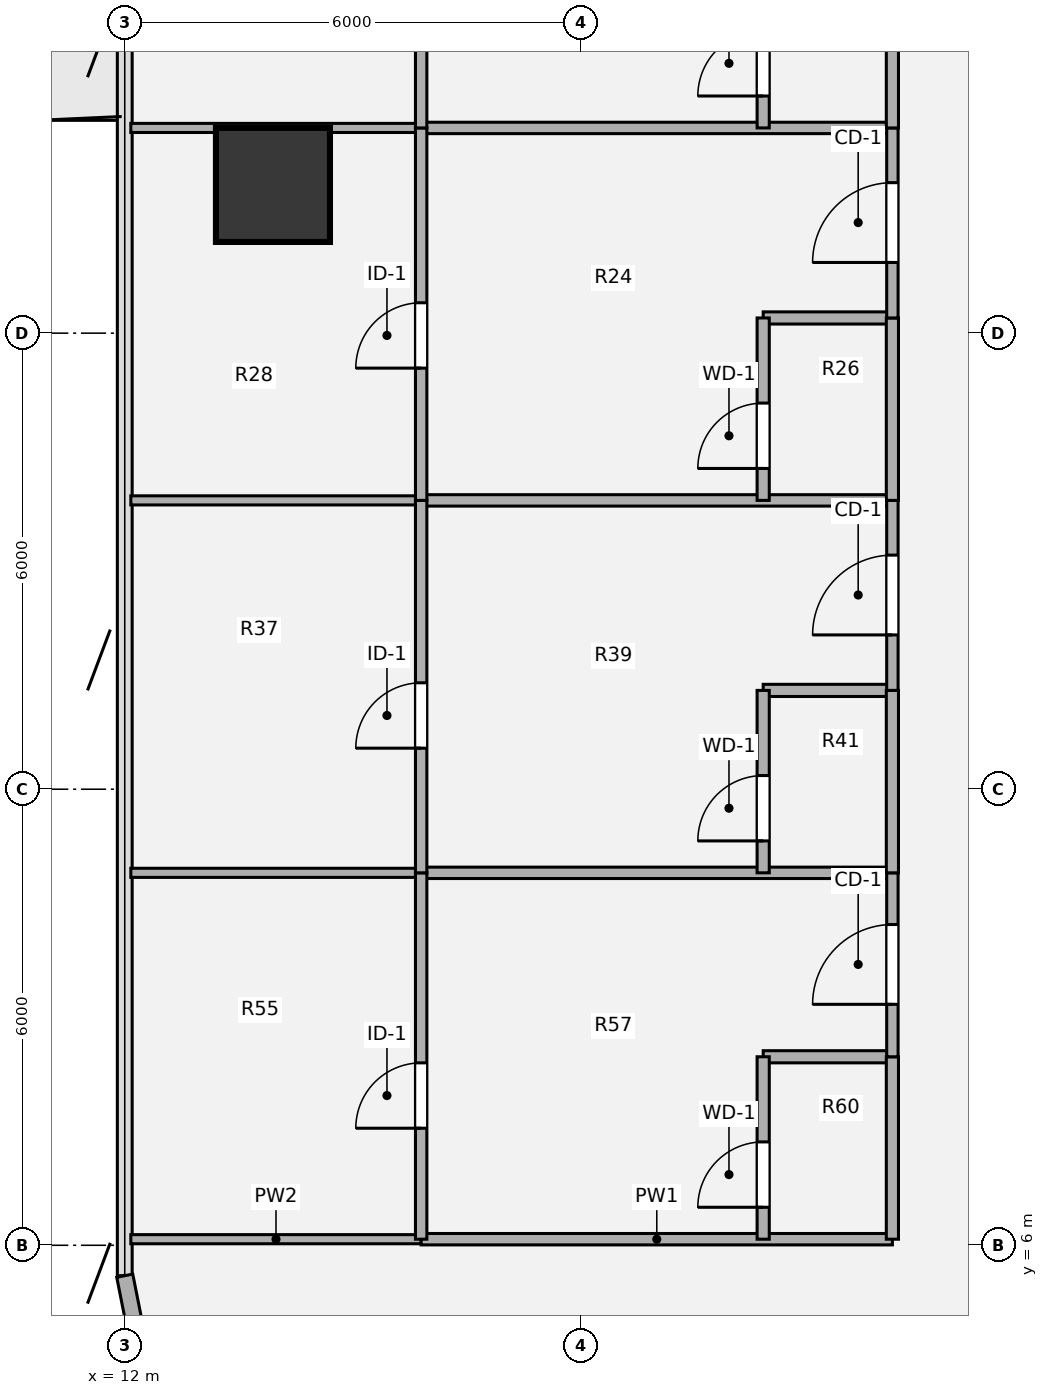
"""IFC4 building model, lengths in metres.
Left out: names, types, materials, properties, quantities, classifications, styles, units other than length and angle.
Written with IfcOpenShell. Run it as: python <this file> out.ifc"""

import sys

from ifc_helpers import new_model, si_unit, direction, frame, frame_2d, origin, origin_2d, place, context, subcontext, project, spatial, rectangle, hollow_circle, extrude, source, transform, mapped, element, fill, save


model = new_model("IFC4")
c1 = context("Model", 3, precision=1e-05, world=origin(), true_north=direction((0.0, 1.0)))
c2 = subcontext(c1, "Body", "Model", "MODEL_VIEW")
j1 = project(units=[si_unit("LENGTHUNIT", "METRE"), si_unit("PLANEANGLEUNIT", "RADIAN")], contexts=[c1])
p1 = place(None, origin())
s1 = spatial("IfcSite", under=j1, at=p1, CompositionType="ELEMENT")
p2 = place(p1, origin())
s2 = spatial("IfcBuilding", under=s1, at=p2, CompositionType="ELEMENT")
p3 = place(p2, frame((0.0, 0.0, 68.58)))
s3 = spatial("IfcBuildingStorey", under=s2, at=p3, CompositionType="ELEMENT", Elevation=68.58)
m1 = source(origin(), c2, "Body", "SweptSolid", [
    extrude(hollow_circle(Radius=0.75, WallThickness=0.05, at=origin_2d()), origin(), (0.0, 0.0, 1.0), 3.78),
])
p4 = place(p3, frame((13.95, 19.95, 0.0), z_axis=(0.0, 0.0, 1.0), x_axis=(1.0, 0.0, 0.0)))
e1 = element("IfcColumn", 1, at=p4, inside=s3, PredefinedType="COLUMN", context=c2, shape_type="MappedRepresentation", body=[
    mapped(m1, transform((0.0, 0.0, 0.0), x_axis=(1.0, 0.0, 0.0), y_axis=(0.0, 1.0, 0.0), z_axis=(0.0, 0.0, 1.0), scale=1.0)),
])
p5 = place(p3, frame((12.244, 4.375, 0.0), z_axis=(0.0, 0.0, 1.0), x_axis=(-0.195138390419, 0.980775717779, 0.0)))
e2 = element("IfcWall", 2, at=p5, inside=s3, PredefinedType="SOLIDWALL", context=c2, shape_type="SweptSolid", body=[
    extrude(rectangle(XDim=1.249, YDim=0.215, at=frame_2d((0.624, 0.0))), origin(), (0.0, 0.0, 1.0), 3.53),
])
p6 = place(p3, frame((12.08, 6.08, 0.0), z_axis=(0.0, 0.0, 1.0), x_axis=(1.0, 0.0, 0.0)))
e3 = element("IfcWall", 3, at=p6, inside=s3, PredefinedType="PARTITIONING", context=c2, shape_type="SweptSolid", body=[
    extrude(rectangle(XDim=3.82, YDim=0.12, at=frame_2d((1.91, 0.0))), origin(), (0.0, 0.0, 1.0), 3.5),
])
p7 = place(p3, frame((15.9, 6.08, 0.0), z_axis=(0.0, 0.0, 1.0), x_axis=(1.0, 0.0, 0.0)))
e4 = element("IfcWall", 4, at=p7, inside=s3, PredefinedType="PARTITIONING", context=c2, shape_type="SweptSolid", body=[
    extrude(rectangle(XDim=6.2, YDim=0.15, at=frame_2d((3.1, 0.0))), origin(), (0.0, 0.0, 1.0), 3.5),
])
p8 = place(p3, frame((20.4, 8.48, 0.0), z_axis=(0.0, 0.0, 1.0), x_axis=(1.0, 0.0, 0.0)))
e5 = element("IfcWall", 5, at=p8, inside=s3, PredefinedType="PLUMBINGWALL", context=c2, shape_type="SweptSolid", body=[
    extrude(rectangle(XDim=1.7, YDim=0.16, at=frame_2d((0.85, 0.0))), origin(), (0.0, 0.0, 1.0), 3.5),
])
p9 = place(p3, frame((12.08, 10.9, 0.0), z_axis=(0.0, 0.0, 1.0), x_axis=(1.0, 0.0, 0.0)))
e6 = element("IfcWall", 6, at=p9, inside=s3, PredefinedType="PARTITIONING", context=c2, shape_type="SweptSolid", body=[
    extrude(rectangle(XDim=3.82, YDim=0.12, at=frame_2d((1.91, 0.0))), origin(), (0.0, 0.0, 1.0), 3.5),
])
p10 = place(p3, frame((15.9, 10.9, 0.0), z_axis=(0.0, 0.0, 1.0), x_axis=(1.0, 0.0, 0.0)))
e7 = element("IfcWall", 7, at=p10, inside=s3, PredefinedType="PARTITIONING", context=c2, shape_type="SweptSolid", body=[
    extrude(rectangle(XDim=6.2, YDim=0.15, at=frame_2d((3.1, 0.0))), origin(), (0.0, 0.0, 1.0), 3.5),
])
p11 = place(p3, frame((20.4, 13.3, 0.0), z_axis=(0.0, 0.0, 1.0), x_axis=(1.0, 0.0, 0.0)))
e8 = element("IfcWall", 8, at=p11, inside=s3, PredefinedType="PLUMBINGWALL", context=c2, shape_type="SweptSolid", body=[
    extrude(rectangle(XDim=1.7, YDim=0.16, at=frame_2d((0.85, 0.0))), origin(), (0.0, 0.0, 1.0), 3.5),
])
p12 = place(p3, frame((12.08, 15.8, 0.0), z_axis=(0.0, 0.0, 1.0), x_axis=(1.0, 0.0, 0.0)))
e9 = element("IfcWall", 9, at=p12, inside=s3, PredefinedType="PARTITIONING", context=c2, shape_type="SweptSolid", body=[
    extrude(rectangle(XDim=3.82, YDim=0.12, at=frame_2d((1.91, 0.0))), origin(), (0.0, 0.0, 1.0), 3.5),
])
p13 = place(p3, frame((15.9, 15.8, 0.0), z_axis=(0.0, 0.0, 1.0), x_axis=(1.0, 0.0, 0.0)))
e10 = element("IfcWall", 10, at=p13, inside=s3, PredefinedType="PARTITIONING", context=c2, shape_type="SweptSolid", body=[
    extrude(rectangle(XDim=6.2, YDim=0.15, at=frame_2d((3.1, 0.0))), origin(), (0.0, 0.0, 1.0), 3.5),
])
p14 = place(p3, frame((20.4, 18.2, 0.0), z_axis=(0.0, 0.0, 1.0), x_axis=(1.0, 0.0, 0.0)))
e11 = element("IfcWall", 11, at=p14, inside=s3, PredefinedType="PLUMBINGWALL", context=c2, shape_type="SweptSolid", body=[
    extrude(rectangle(XDim=1.7, YDim=0.16, at=frame_2d((0.85, 0.0))), origin(), (0.0, 0.0, 1.0), 2.715),
])
p15 = place(p3, frame((12.08, 20.7, 0.0), z_axis=(0.0, 0.0, 1.0), x_axis=(1.0, 0.0, 0.0)))
e12 = element("IfcWall", 12, at=p15, inside=s3, PredefinedType="PARTITIONING", context=c2, shape_type="SweptSolid", body=[
    extrude(rectangle(XDim=3.82, YDim=0.12, at=frame_2d((1.91, 0.0))), origin(), (0.0, 0.0, 1.0), 2.982),
])
p16 = place(p3, frame((15.9, 20.7, 0.0), z_axis=(0.0, 0.0, 1.0), x_axis=(1.0, 0.0, 0.0)))
e13 = element("IfcWall", 13, at=p16, inside=s3, PredefinedType="PARTITIONING", context=c2, shape_type="SweptSolid", body=[
    extrude(rectangle(XDim=6.2, YDim=0.15, at=frame_2d((3.1, 0.0))), origin(), (0.0, 0.0, 1.0), 2.982),
])
p17 = place(p3, frame((15.9, 6.08, 0.0), z_axis=(0.0, 0.0, 1.0), x_axis=(0.0, 1.0, 0.0)))
e14 = element("IfcWall", 14, at=p17, inside=s3, PredefinedType="PARTITIONING", context=c2, shape_type="SweptSolid", body=[
    extrude(rectangle(XDim=4.82, YDim=0.15, at=frame_2d((2.41, 0.0))), origin(), (0.0, 0.0, 1.0), 3.5),
])
p18 = place(p17, frame((1.46, 0.0, 0.0)))
e15 = element("IfcOpeningElement", 15, at=p18, cuts=e14, PredefinedType="OPENING", context=c2, shape_type="SweptSolid", body=[
    extrude(rectangle(XDim=0.86, YDim=2.1, at=origin_2d()), frame((0.43, 0.085, 1.05), z_axis=(0.0, -1.0, 0.0), x_axis=(1.0, 0.0, 0.0)), (0.0, 0.0, 1.0), 0.17),
])
p19 = place(p3, frame((15.9, 10.9, 0.0), z_axis=(0.0, 0.0, 1.0), x_axis=(0.0, 1.0, 0.0)))
e16 = element("IfcWall", 16, at=p19, inside=s3, PredefinedType="PARTITIONING", context=c2, shape_type="SweptSolid", body=[
    extrude(rectangle(XDim=4.9, YDim=0.15, at=frame_2d((2.45, 0.0))), origin(), (0.0, 0.0, 1.0), 3.5),
])
p20 = place(p19, frame((1.64, 0.0, 0.0)))
e17 = element("IfcOpeningElement", 17, at=p20, cuts=e16, PredefinedType="OPENING", context=c2, shape_type="SweptSolid", body=[
    extrude(rectangle(XDim=0.86, YDim=2.1, at=origin_2d()), frame((0.43, 0.085, 1.05), z_axis=(0.0, -1.0, 0.0), x_axis=(1.0, 0.0, 0.0)), (0.0, 0.0, 1.0), 0.17),
])
p21 = place(p3, frame((15.9, 15.8, 0.0), z_axis=(0.0, 0.0, 1.0), x_axis=(0.0, 1.0, 0.0)))
e18 = element("IfcWall", 18, at=p21, inside=s3, PredefinedType="PARTITIONING", context=c2, shape_type="SweptSolid", body=[
    extrude(rectangle(XDim=4.9, YDim=0.15, at=frame_2d((2.45, 0.0))), origin(), (0.0, 0.0, 1.0), 3.5),
])
p22 = place(p21, frame((1.74, 0.0, 0.0)))
e19 = element("IfcOpeningElement", 19, at=p22, cuts=e18, PredefinedType="OPENING", context=c2, shape_type="SweptSolid", body=[
    extrude(rectangle(XDim=0.86, YDim=2.1, at=origin_2d()), frame((0.43, 0.085, 1.05), z_axis=(0.0, -1.0, 0.0), x_axis=(1.0, 0.0, 0.0)), (0.0, 0.0, 1.0), 0.17),
])
p23 = place(p3, frame((15.9, 20.7, 0.0), z_axis=(0.0, 0.0, 1.0), x_axis=(0.0, 1.0, 0.0)))
e20 = element("IfcWall", 20, at=p23, inside=s3, PredefinedType="PARTITIONING", context=c2, shape_type="SweptSolid", body=[
    extrude(rectangle(XDim=4.9, YDim=0.15, at=frame_2d((2.45, 0.0))), origin(), (0.0, 0.0, 1.0), 3.5),
])
p24 = place(p23, frame((1.84, 0.0, 0.0)))
e21 = element("IfcOpeningElement", 21, at=p24, cuts=e20, PredefinedType="OPENING", context=c2, shape_type="SweptSolid", body=[
    extrude(rectangle(XDim=0.86, YDim=2.1, at=origin_2d()), frame((0.43, 0.085, 1.05), z_axis=(0.0, -1.0, 0.0), x_axis=(1.0, 0.0, 0.0)), (0.0, 0.0, 1.0), 0.17),
])
p25 = place(p3, frame((20.4, 6.08, 0.0), z_axis=(0.0, 0.0, 1.0), x_axis=(0.0, 1.0, 0.0)))
e22 = element("IfcWall", 22, at=p25, inside=s3, PredefinedType="PLUMBINGWALL", context=c2, shape_type="SweptSolid", body=[
    extrude(rectangle(XDim=2.4, YDim=0.16, at=frame_2d((1.2, 0.0))), origin(), (0.0, 0.0, 1.0), 3.5),
])
p26 = place(p25, frame((0.42, 0.0, 0.0)))
e23 = element("IfcOpeningElement", 23, at=p26, cuts=e22, PredefinedType="OPENING", context=c2, shape_type="SweptSolid", body=[
    extrude(rectangle(XDim=0.86, YDim=2.1, at=origin_2d()), frame((0.43, 0.09, 1.05), z_axis=(0.0, -1.0, 0.0), x_axis=(1.0, 0.0, 0.0)), (0.0, 0.0, 1.0), 0.18),
])
p27 = place(p3, frame((20.4, 10.9, 0.0), z_axis=(0.0, 0.0, 1.0), x_axis=(0.0, 1.0, 0.0)))
e24 = element("IfcWall", 24, at=p27, inside=s3, PredefinedType="PLUMBINGWALL", context=c2, shape_type="SweptSolid", body=[
    extrude(rectangle(XDim=2.4, YDim=0.16, at=frame_2d((1.2, 0.0))), origin(), (0.0, 0.0, 1.0), 3.5),
])
p28 = place(p27, frame((0.42, 0.0, 0.0)))
e25 = element("IfcOpeningElement", 25, at=p28, cuts=e24, PredefinedType="OPENING", context=c2, shape_type="SweptSolid", body=[
    extrude(rectangle(XDim=0.86, YDim=2.1, at=origin_2d()), frame((0.43, 0.09, 1.05), z_axis=(0.0, -1.0, 0.0), x_axis=(1.0, 0.0, 0.0)), (0.0, 0.0, 1.0), 0.18),
])
p29 = place(p3, frame((20.4, 15.8, 0.0), z_axis=(0.0, 0.0, 1.0), x_axis=(0.0, 1.0, 0.0)))
e26 = element("IfcWall", 26, at=p29, inside=s3, PredefinedType="PLUMBINGWALL", context=c2, shape_type="SweptSolid", body=[
    extrude(rectangle(XDim=2.4, YDim=0.16, at=frame_2d((1.2, 0.0))), origin(), (0.0, 0.0, 1.0), 3.5),
])
p30 = place(p29, frame((0.42, 0.0, 0.0)))
e27 = element("IfcOpeningElement", 27, at=p30, cuts=e26, PredefinedType="OPENING", context=c2, shape_type="SweptSolid", body=[
    extrude(rectangle(XDim=0.86, YDim=2.1, at=origin_2d()), frame((0.43, 0.09, 1.05), z_axis=(0.0, -1.0, 0.0), x_axis=(1.0, 0.0, 0.0)), (0.0, 0.0, 1.0), 0.18),
])
p31 = place(p3, frame((20.4, 20.7, 0.0), z_axis=(0.0, 0.0, 1.0), x_axis=(0.0, 1.0, 0.0)))
e28 = element("IfcWall", 28, at=p31, inside=s3, PredefinedType="PLUMBINGWALL", context=c2, shape_type="SweptSolid", body=[
    extrude(rectangle(XDim=2.4, YDim=0.16, at=frame_2d((1.2, 0.0))), origin(), (0.0, 0.0, 1.0), 3.5),
])
p32 = place(p31, frame((0.42, 0.0, 0.0)))
e29 = element("IfcOpeningElement", 29, at=p32, cuts=e28, PredefinedType="OPENING", context=c2, shape_type="SweptSolid", body=[
    extrude(rectangle(XDim=0.86, YDim=2.1, at=origin_2d()), frame((0.43, 0.09, 1.05), z_axis=(0.0, -1.0, 0.0), x_axis=(1.0, 0.0, 0.0)), (0.0, 0.0, 1.0), 0.18),
])
p33 = place(p3, frame((22.1, 6.08, 0.0), z_axis=(0.0, 0.0, 1.0), x_axis=(0.0, 1.0, 0.0)))
e30 = element("IfcWall", 30, at=p33, inside=s3, PredefinedType="PLUMBINGWALL", context=c2, shape_type="SweptSolid", body=[
    extrude(rectangle(XDim=2.4, YDim=0.16, at=frame_2d((1.2, 0.0))), origin(), (0.0, 0.0, 1.0), 3.5),
])
p34 = place(p3, frame((22.1, 8.48, 0.0), z_axis=(0.0, 0.0, 1.0), x_axis=(0.0, 1.0, 0.0)))
e31 = element("IfcWall", 31, at=p34, inside=s3, PredefinedType="PARTITIONING", context=c2, shape_type="SweptSolid", body=[
    extrude(rectangle(XDim=2.42, YDim=0.15, at=frame_2d((1.21, 0.0))), origin(), (0.0, 0.0, 1.0), 3.5),
])
p35 = place(p34, frame((0.69, 0.0, 0.0)))
e32 = element("IfcOpeningElement", 32, at=p35, cuts=e31, PredefinedType="OPENING", context=c2, shape_type="SweptSolid", body=[
    extrude(rectangle(XDim=1.05, YDim=2.1, at=origin_2d()), frame((0.525, 0.085, 1.05), z_axis=(0.0, -1.0, 0.0), x_axis=(1.0, 0.0, 0.0)), (0.0, 0.0, 1.0), 0.17),
])
p36 = place(p3, frame((22.1, 10.9, 0.0), z_axis=(0.0, 0.0, 1.0), x_axis=(0.0, 1.0, 0.0)))
e33 = element("IfcWall", 33, at=p36, inside=s3, PredefinedType="PLUMBINGWALL", context=c2, shape_type="SweptSolid", body=[
    extrude(rectangle(XDim=2.4, YDim=0.16, at=frame_2d((1.2, 0.0))), origin(), (0.0, 0.0, 1.0), 3.5),
])
p37 = place(p3, frame((22.1, 13.3, 0.0), z_axis=(0.0, 0.0, 1.0), x_axis=(0.0, 1.0, 0.0)))
e34 = element("IfcWall", 34, at=p37, inside=s3, PredefinedType="PARTITIONING", context=c2, shape_type="SweptSolid", body=[
    extrude(rectangle(XDim=2.5, YDim=0.15, at=frame_2d((1.25, 0.0))), origin(), (0.0, 0.0, 1.0), 3.5),
])
p38 = place(p37, frame((0.73, 0.0, 0.0)))
e35 = element("IfcOpeningElement", 35, at=p38, cuts=e34, PredefinedType="OPENING", context=c2, shape_type="SweptSolid", body=[
    extrude(rectangle(XDim=1.05, YDim=2.1, at=origin_2d()), frame((0.525, 0.085, 1.05), z_axis=(0.0, -1.0, 0.0), x_axis=(1.0, 0.0, 0.0)), (0.0, 0.0, 1.0), 0.17),
])
p39 = place(p3, frame((22.1, 15.8, 0.0), z_axis=(0.0, 0.0, 1.0), x_axis=(0.0, 1.0, 0.0)))
e36 = element("IfcWall", 36, at=p39, inside=s3, PredefinedType="PLUMBINGWALL", context=c2, shape_type="SweptSolid", body=[
    extrude(rectangle(XDim=2.4, YDim=0.16, at=frame_2d((1.2, 0.0))), origin(), (0.0, 0.0, 1.0), 3.5),
])
p40 = place(p3, frame((22.1, 18.2, 0.0), z_axis=(0.0, 0.0, 1.0), x_axis=(0.0, 1.0, 0.0)))
e37 = element("IfcWall", 37, at=p40, inside=s3, PredefinedType="PARTITIONING", context=c2, shape_type="SweptSolid", body=[
    extrude(rectangle(XDim=2.5, YDim=0.15, at=frame_2d((1.25, 0.0))), origin(), (0.0, 0.0, 1.0), 3.5),
])
p41 = place(p40, frame((0.73, 0.0, 0.0)))
e38 = element("IfcOpeningElement", 38, at=p41, cuts=e37, PredefinedType="OPENING", context=c2, shape_type="SweptSolid", body=[
    extrude(rectangle(XDim=1.05, YDim=2.1, at=origin_2d()), frame((0.525, 0.085, 1.05), z_axis=(0.0, -1.0, 0.0), x_axis=(1.0, 0.0, 0.0)), (0.0, 0.0, 1.0), 0.17),
])
p42 = place(p3, frame((22.1, 20.7, 0.0), z_axis=(0.0, 0.0, 1.0), x_axis=(0.0, 1.0, 0.0)))
e39 = element("IfcWall", 39, at=p42, inside=s3, PredefinedType="PLUMBINGWALL", context=c2, shape_type="SweptSolid", body=[
    extrude(rectangle(XDim=2.4, YDim=0.16, at=frame_2d((1.2, 0.0))), origin(), (0.0, 0.0, 1.0), 3.5),
])
m2 = source(origin(), c2, "Body", "SweptSolid", [
    extrude(rectangle(XDim=0.86, YDim=2.1, at=origin_2d()), frame((0.43, 0.025, 1.05), z_axis=(0.0, -1.0, 0.0), x_axis=(1.0, 0.0, 0.0)), (0.0, 0.0, 1.0), 0.05),
])
p43 = place(p18, origin())
e40 = element("IfcDoor", 40, at=p43, inside=s3, OperationType="SINGLE_SWING_LEFT", PredefinedType="DOOR", context=c2, shape_type="MappedRepresentation", body=[
    mapped(m2, transform((0.0, 0.0, 0.0), x_axis=(1.0, 0.0, 0.0), y_axis=(0.0, 1.0, 0.0), z_axis=(0.0, 0.0, 1.0), scale=1.0)),
])
fill(e15, e40)
p44 = place(p20, origin())
e41 = element("IfcDoor", 41, at=p44, inside=s3, OperationType="SINGLE_SWING_LEFT", PredefinedType="DOOR", context=c2, shape_type="MappedRepresentation", body=[
    mapped(m2, transform((0.0, 0.0, 0.0), x_axis=(1.0, 0.0, 0.0), y_axis=(0.0, 1.0, 0.0), z_axis=(0.0, 0.0, 1.0), scale=1.0)),
])
fill(e17, e41)
p45 = place(p22, origin())
e42 = element("IfcDoor", 42, at=p45, inside=s3, OperationType="SINGLE_SWING_LEFT", PredefinedType="DOOR", context=c2, shape_type="MappedRepresentation", body=[
    mapped(m2, transform((0.0, 0.0, 0.0), x_axis=(1.0, 0.0, 0.0), y_axis=(0.0, 1.0, 0.0), z_axis=(0.0, 0.0, 1.0), scale=1.0)),
])
fill(e19, e42)
m3 = source(origin(), c2, "Body", "SweptSolid", [
    extrude(rectangle(XDim=0.86, YDim=2.1, at=origin_2d()), frame((0.43, 0.025, 1.05), z_axis=(0.0, -1.0, 0.0), x_axis=(1.0, 0.0, 0.0)), (0.0, 0.0, 1.0), 0.05),
])
p46 = place(p26, origin())
e43 = element("IfcDoor", 43, at=p46, inside=s3, OperationType="SINGLE_SWING_LEFT", PredefinedType="DOOR", context=c2, shape_type="MappedRepresentation", body=[
    mapped(m3, transform((0.0, 0.0, 0.0), x_axis=(1.0, 0.0, 0.0), y_axis=(0.0, 1.0, 0.0), z_axis=(0.0, 0.0, 1.0), scale=1.0)),
])
fill(e23, e43)
p47 = place(p28, origin())
e44 = element("IfcDoor", 44, at=p47, inside=s3, OperationType="SINGLE_SWING_LEFT", PredefinedType="DOOR", context=c2, shape_type="MappedRepresentation", body=[
    mapped(m3, transform((0.0, 0.0, 0.0), x_axis=(1.0, 0.0, 0.0), y_axis=(0.0, 1.0, 0.0), z_axis=(0.0, 0.0, 1.0), scale=1.0)),
])
fill(e25, e44)
p48 = place(p30, origin())
e45 = element("IfcDoor", 45, at=p48, inside=s3, OperationType="SINGLE_SWING_LEFT", PredefinedType="DOOR", context=c2, shape_type="MappedRepresentation", body=[
    mapped(m3, transform((0.0, 0.0, 0.0), x_axis=(1.0, 0.0, 0.0), y_axis=(0.0, 1.0, 0.0), z_axis=(0.0, 0.0, 1.0), scale=1.0)),
])
fill(e27, e45)
p49 = place(p32, origin())
e46 = element("IfcDoor", 46, at=p49, inside=s3, OperationType="SINGLE_SWING_LEFT", PredefinedType="DOOR", context=c2, shape_type="MappedRepresentation", body=[
    mapped(m3, transform((0.0, 0.0, 0.0), x_axis=(1.0, 0.0, 0.0), y_axis=(0.0, 1.0, 0.0), z_axis=(0.0, 0.0, 1.0), scale=1.0)),
])
fill(e29, e46)
m4 = source(origin(), c2, "Body", "SweptSolid", [
    extrude(rectangle(XDim=1.05, YDim=2.1, at=origin_2d()), frame((0.525, 0.025, 1.05), z_axis=(0.0, -1.0, 0.0), x_axis=(1.0, 0.0, 0.0)), (0.0, 0.0, 1.0), 0.05),
])
p50 = place(p35, origin())
e47 = element("IfcDoor", 47, at=p50, inside=s3, OperationType="SINGLE_SWING_LEFT", PredefinedType="DOOR", context=c2, shape_type="MappedRepresentation", body=[
    mapped(m4, transform((0.0, 0.0, 0.0), x_axis=(1.0, 0.0, 0.0), y_axis=(0.0, 1.0, 0.0), z_axis=(0.0, 0.0, 1.0), scale=1.0)),
])
fill(e32, e47)
p51 = place(p38, origin())
e48 = element("IfcDoor", 48, at=p51, inside=s3, OperationType="SINGLE_SWING_LEFT", PredefinedType="DOOR", context=c2, shape_type="MappedRepresentation", body=[
    mapped(m4, transform((0.0, 0.0, 0.0), x_axis=(1.0, 0.0, 0.0), y_axis=(0.0, 1.0, 0.0), z_axis=(0.0, 0.0, 1.0), scale=1.0)),
])
fill(e35, e48)
p52 = place(p41, origin())
e49 = element("IfcDoor", 49, at=p52, inside=s3, OperationType="SINGLE_SWING_LEFT", PredefinedType="DOOR", context=c2, shape_type="MappedRepresentation", body=[
    mapped(m4, transform((0.0, 0.0, 0.0), x_axis=(1.0, 0.0, 0.0), y_axis=(0.0, 1.0, 0.0), z_axis=(0.0, 0.0, 1.0), scale=1.0)),
])
fill(e38, e49)
save(model, sys.argv[1])
